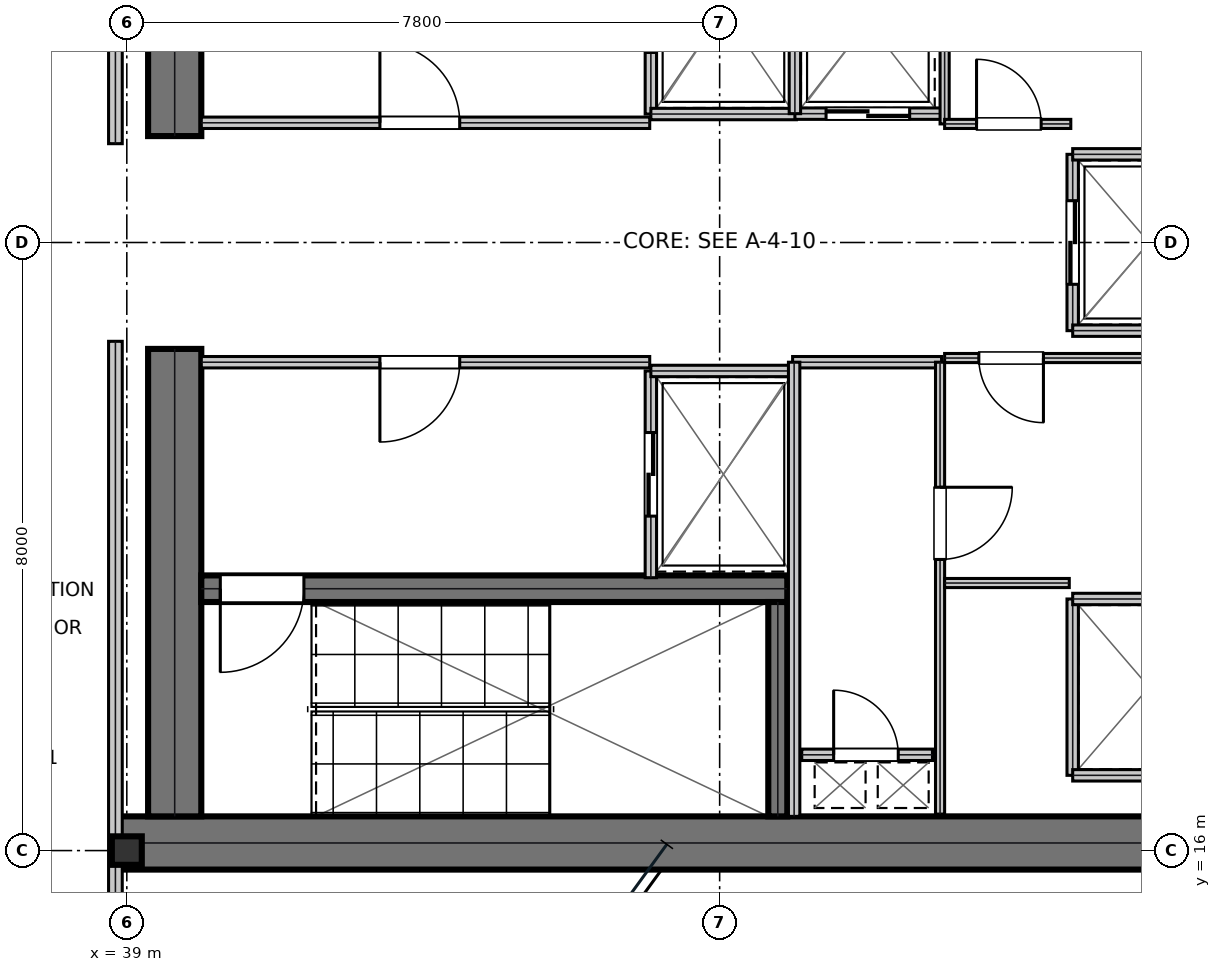
"""IFC4 building model, lengths in metres.
Left out: names, types, materials, properties, quantities, classifications, styles, units other than length and angle.
Written with IfcOpenShell. Run it as: python <this file> out.ifc"""

import sys

from ifc_helpers import new_model, si_unit, direction, frame, frame_2d, origin, origin_2d, place, context, subcontext, project, spatial, rectangle, i_section, extrude, element, fill, save


model = new_model("IFC4")
c1 = context("Model", 3, precision=1e-05, world=origin(), true_north=direction((0.0, 1.0)))
c2 = subcontext(c1, "Body", "Model", "MODEL_VIEW")
j1 = project(units=[si_unit("LENGTHUNIT", "METRE"), si_unit("PLANEANGLEUNIT", "RADIAN")], contexts=[c1])
p1 = place(None, origin())
s1 = spatial("IfcSite", under=j1, at=p1, CompositionType="ELEMENT")
p2 = place(p1, origin())
s2 = spatial("IfcBuilding", under=s1, at=p2, CompositionType="ELEMENT")
p3 = place(p2, frame((0.0, 0.0, 232.35)))
s3 = spatial("IfcBuildingStorey", under=s2, at=p3, CompositionType="ELEMENT", Elevation=232.35)
p4 = place(p3, frame((38.8, 16.1, 0.0), z_axis=(0.0, 0.0, 1.0), x_axis=(1.0, 0.0, 0.0)))
e1 = element("IfcWall", 1, at=p4, inside=s3, PredefinedType="SHEAR", context=c2, shape_type="SweptSolid", body=[
    extrude(rectangle(XDim=16.0, YDim=0.7, at=frame_2d((8.0, 0.0))), origin(), (0.0, 0.0, 1.0), 3.79),
])
for number, where, z_axis, x_axis in (
    (2, (39.63, 16.45, 0.0), (0.0, 0.0, 1.0), (0.0, 1.0, 0.0)),
    (3, (39.63, 25.4, 0.0), (0.0, 0.0, 1.0), (0.0, 1.0, 0.0)),
):
    element("IfcWall", number, at=place(p3, frame(where, z_axis=z_axis, x_axis=x_axis)), inside=s3, PredefinedType="SHEAR", context=c2, shape_type="SweptSolid", body=[
        extrude(rectangle(XDim=6.15, YDim=0.7, at=frame_2d((3.075, 0.0))), origin(), (0.0, 0.0, 1.0), 3.79),
    ])
p5 = place(p3, frame((39.98, 19.445, 0.0), z_axis=(0.0, 0.0, 1.0), x_axis=(1.0, 0.0, 0.0)))
e4 = element("IfcWall", 4, at=p5, inside=s3, PredefinedType="SHEAR", context=c2, shape_type="SweptSolid", body=[
    extrude(rectangle(XDim=7.71, YDim=0.35, at=frame_2d((3.855, 0.0))), origin(), (0.0, 0.0, 1.0), 3.79),
])
p6 = place(p5, frame((0.25, 0.0, 0.0)))
e5 = element("IfcOpeningElement", 5, at=p6, cuts=e4, PredefinedType="OPENING", context=c2, shape_type="SweptSolid", body=[
    extrude(rectangle(XDim=1.1, YDim=2.15, at=frame_2d((0.55, 1.075))), frame((0.0, 0.185, 0.0), z_axis=(0.0, -1.0, 0.0), x_axis=(1.0, 0.0, 0.0)), (0.0, 0.0, 1.0), 0.37),
])
p7 = place(p3, frame((47.565, 16.45, 0.0), z_axis=(0.0, 0.0, 1.0), x_axis=(0.0, 1.0, 0.0)))
e6 = element("IfcWall", 6, at=p7, inside=s3, PredefinedType="SHEAR", context=c2, shape_type="SweptSolid", body=[
    extrude(rectangle(XDim=2.82, YDim=0.25, at=frame_2d((1.41, 0.0))), origin(), (0.0, 0.0, 1.0), 3.79),
])
p8 = place(p3, frame((39.0, 16.0, 0.0), z_axis=(0.0, 0.0, 1.0), x_axis=(1.0, 0.0, 0.0)))
e7 = element("IfcColumn", 7, at=p8, inside=s3, PredefinedType="COLUMN", context=c2, shape_type="SweptSolid", body=[
    extrude(i_section(OverallWidth=0.394, OverallDepth=0.375, WebThickness=0.017, FlangeThickness=0.028, at=origin_2d()), origin(), (0.0, 0.0, 1.0), 4.044),
])
p9 = place(p3, frame((39.98, 25.575, 0.0), z_axis=(0.0, 0.0, 1.0), x_axis=(1.0, 0.0, 0.0)))
e8 = element("IfcWall", 8, at=p9, inside=s3, PredefinedType="PARTITIONING", context=c2, shape_type="SweptSolid", body=[
    extrude(rectangle(XDim=5.9, YDim=0.15, at=frame_2d((2.95, 0.0))), origin(), (0.0, 0.0, 1.0), 3.79),
])
p10 = place(p9, frame((2.35, 0.0, 0.0)))
e9 = element("IfcOpeningElement", 9, at=p10, cuts=e8, PredefinedType="OPENING", context=c2, shape_type="SweptSolid", body=[
    extrude(rectangle(XDim=1.05, YDim=2.15, at=frame_2d((0.525, 1.075))), frame((0.0, 0.085, 0.0), z_axis=(0.0, -1.0, 0.0), x_axis=(1.0, 0.0, 0.0)), (0.0, 0.0, 1.0), 0.17),
])
p11 = place(p3, frame((39.98, 22.425, 0.0), z_axis=(0.0, 0.0, 1.0), x_axis=(1.0, 0.0, 0.0)))
e10 = element("IfcWall", 10, at=p11, inside=s3, PredefinedType="PARTITIONING", context=c2, shape_type="SweptSolid", body=[
    extrude(rectangle(XDim=5.9, YDim=0.15, at=frame_2d((2.95, 0.0))), origin(), (0.0, 0.0, 1.0), 3.79),
])
p12 = place(p11, frame((2.35, 0.0, 0.0)))
e11 = element("IfcOpeningElement", 11, at=p12, cuts=e10, PredefinedType="OPENING", context=c2, shape_type="SweptSolid", body=[
    extrude(rectangle(XDim=1.05, YDim=2.15, at=frame_2d((0.525, 1.075))), frame((0.0, 0.085, 0.0), z_axis=(0.0, -1.0, 0.0), x_axis=(1.0, 0.0, 0.0)), (0.0, 0.0, 1.0), 0.17),
])
p13 = place(p3, frame((45.895, 25.69, 0.0), z_axis=(0.0, 0.0, 1.0), x_axis=(0.0, 1.0, 0.0)))
e12 = element("IfcWall", 12, at=p13, inside=s3, PredefinedType="PARTITIONING", context=c2, shape_type="SweptSolid", body=[
    extrude(rectangle(XDim=2.72, YDim=0.15, at=frame_2d((1.36, 0.0))), origin(), (0.0, 0.0, 1.0), 3.79),
])
p14 = place(p13, frame((0.81, 0.0, 0.0)))
e13 = element("IfcOpeningElement", 13, at=p14, cuts=e12, PredefinedType="OPENING", context=c2, shape_type="SweptSolid", body=[
    extrude(rectangle(XDim=1.1, YDim=2.15, at=frame_2d((0.55, 1.075))), frame((0.0, 0.085, 0.0), z_axis=(0.0, -1.0, 0.0), x_axis=(1.0, 0.0, 0.0)), (0.0, 0.0, 1.0), 0.17),
])
p15 = place(p3, frame((45.895, 25.69, 0.0), z_axis=(0.0, 0.0, 1.0), x_axis=(1.0, 0.0, 0.0)))
e14 = element("IfcWall", 14, at=p15, inside=s3, PredefinedType="PARTITIONING", context=c2, shape_type="SweptSolid", body=[
    extrude(rectangle(XDim=1.915, YDim=0.15, at=frame_2d((0.958, 0.0))), origin(), (0.0, 0.0, 1.0), 3.79),
])
p16 = place(p3, frame((45.895, 19.59, 0.0), z_axis=(0.0, 0.0, 1.0), x_axis=(0.0, 1.0, 0.0)))
e15 = element("IfcWall", 15, at=p16, inside=s3, PredefinedType="PARTITIONING", context=c2, shape_type="SweptSolid", body=[
    extrude(rectangle(XDim=2.72, YDim=0.15, at=frame_2d((1.36, 0.0))), origin(), (0.0, 0.0, 1.0), 3.79),
])
p17 = place(p16, frame((0.81, 0.0, 0.0)))
e16 = element("IfcOpeningElement", 16, at=p17, cuts=e15, PredefinedType="OPENING", context=c2, shape_type="SweptSolid", body=[
    extrude(rectangle(XDim=1.1, YDim=2.15, at=frame_2d((0.55, 1.075))), frame((0.0, 0.085, 0.0), z_axis=(0.0, -1.0, 0.0), x_axis=(1.0, 0.0, 0.0)), (0.0, 0.0, 1.0), 0.17),
])
p18 = place(p3, frame((45.895, 22.31, 0.0), z_axis=(0.0, 0.0, 1.0), x_axis=(1.0, 0.0, 0.0)))
e17 = element("IfcWall", 17, at=p18, inside=s3, PredefinedType="PARTITIONING", context=c2, shape_type="SweptSolid", body=[
    extrude(rectangle(XDim=1.915, YDim=0.15, at=frame_2d((0.958, 0.0))), origin(), (0.0, 0.0, 1.0), 3.79),
])
p19 = place(p3, frame((47.79, 25.695, 0.0), z_axis=(0.0, 0.0, 1.0), x_axis=(1.0, 0.0, 0.0)))
e18 = element("IfcWall", 18, at=p19, inside=s3, PredefinedType="PARTITIONING", context=c2, shape_type="SweptSolid", body=[
    extrude(rectangle(XDim=1.92, YDim=0.15, at=frame_2d((0.96, 0.0))), origin(), (0.0, 0.0, 1.0), 3.79),
])
p20 = place(p19, frame((0.41, 0.0, 0.0)))
e19 = element("IfcOpeningElement", 19, at=p20, cuts=e18, PredefinedType="OPENING", context=c2, shape_type="SweptSolid", body=[
    extrude(rectangle(XDim=1.1, YDim=2.15, at=frame_2d((0.55, 1.075))), frame((0.0, 0.085, 0.0), z_axis=(0.0, -1.0, 0.0), x_axis=(1.0, 0.0, 0.0)), (0.0, 0.0, 1.0), 0.17),
])
p21 = place(p3, frame((47.79, 25.695, 0.0), z_axis=(0.0, 0.0, 1.0), x_axis=(0.0, 1.0, 0.0)))
e20 = element("IfcWall", 20, at=p21, inside=s3, PredefinedType="PARTITIONING", context=c2, shape_type="SweptSolid", body=[
    extrude(rectangle(XDim=2.415, YDim=0.15, at=frame_2d((1.208, 0.0))), origin(), (0.0, 0.0, 1.0), 3.79),
])
p22 = place(p3, frame((51.445, 22.84, 0.0), z_axis=(0.0, 0.0, 1.0), x_axis=(0.0, 1.0, 0.0)))
e21 = element("IfcWall", 21, at=p22, inside=s3, PredefinedType="PARTITIONING", context=c2, shape_type="SweptSolid", body=[
    extrude(rectangle(XDim=2.32, YDim=0.15, at=frame_2d((1.16, 0.0))), origin(), (0.0, 0.0, 1.0), 3.79),
])
p23 = place(p22, frame((0.61, 0.0, 0.0)))
e22 = element("IfcOpeningElement", 22, at=p23, cuts=e21, PredefinedType="OPENING", context=c2, shape_type="SweptSolid", body=[
    extrude(rectangle(XDim=1.1, YDim=2.15, at=frame_2d((0.55, 1.075))), frame((0.0, 0.085, 0.0), z_axis=(0.0, -1.0, 0.0), x_axis=(1.0, 0.0, 0.0)), (0.0, 0.0, 1.0), 0.17),
])
for number, where, z_axis, x_axis in (
    (23, (51.445, 22.84, 0.0), (0.0, 0.0, 1.0), (1.0, 0.0, 0.0)),
    (24, (51.445, 25.16, 0.0), (0.0, 0.0, 1.0), (1.0, 0.0, 0.0)),
):
    element("IfcWall", number, at=place(p3, frame(where, z_axis=z_axis, x_axis=x_axis)), inside=s3, PredefinedType="PARTITIONING", context=c2, shape_type="SweptSolid", body=[
        extrude(rectangle(XDim=2.015, YDim=0.15, at=frame_2d((1.007, 0.0))), origin(), (0.0, 0.0, 1.0), 3.79),
    ])
p24 = place(p3, frame((51.445, 16.99, 0.0), z_axis=(0.0, 0.0, 1.0), x_axis=(0.0, 1.0, 0.0)))
e25 = element("IfcWall", 25, at=p24, inside=s3, PredefinedType="PARTITIONING", context=c2, shape_type="SweptSolid", body=[
    extrude(rectangle(XDim=2.32, YDim=0.15, at=frame_2d((1.16, 0.0))), origin(), (0.0, 0.0, 1.0), 3.79),
])
for number, where, z_axis, x_axis in (
    (26, (51.445, 16.99, 0.0), (0.0, 0.0, 1.0), (1.0, 0.0, 0.0)),
    (27, (51.445, 19.31, 0.0), (0.0, 0.0, 1.0), (1.0, 0.0, 0.0)),
):
    element("IfcWall", number, at=place(p3, frame(where, z_axis=z_axis, x_axis=x_axis)), inside=s3, PredefinedType="PARTITIONING", context=c2, shape_type="SweptSolid", body=[
        extrude(rectangle(XDim=2.015, YDim=0.15, at=frame_2d((1.007, 0.0))), origin(), (0.0, 0.0, 1.0), 3.79),
    ])
p25 = place(p3, frame((47.88, 17.26, 0.0), z_axis=(0.0, 0.0, 1.0), x_axis=(1.0, 0.0, 0.0)))
e28 = element("IfcWall", 28, at=p25, inside=s3, PredefinedType="PARTITIONING", context=c2, shape_type="SweptSolid", body=[
    extrude(rectangle(XDim=1.72, YDim=0.15, at=frame_2d((0.86, 0.0))), origin(), (0.0, 0.0, 1.0), 3.79),
])
p26 = place(p25, frame((0.42, 0.0, 0.0)))
e29 = element("IfcOpeningElement", 29, at=p26, cuts=e28, PredefinedType="OPENING", context=c2, shape_type="SweptSolid", body=[
    extrude(rectangle(XDim=0.85, YDim=2.15, at=frame_2d((0.425, 1.075))), frame((0.0, 0.085, 0.0), z_axis=(0.0, -1.0, 0.0), x_axis=(1.0, 0.0, 0.0)), (0.0, 0.0, 1.0), 0.17),
])
p27 = place(p3, frame((47.76, 22.425, 0.0), z_axis=(0.0, 0.0, 1.0), x_axis=(1.0, 0.0, 0.0)))
e30 = element("IfcWall", 30, at=p27, inside=s3, PredefinedType="PARTITIONING", context=c2, shape_type="SweptSolid", body=[
    extrude(rectangle(XDim=1.96, YDim=0.15, at=frame_2d((0.98, 0.0))), origin(), (0.0, 0.0, 1.0), 3.79),
])
p28 = place(p3, frame((47.78, 16.45, 0.0), z_axis=(0.0, 0.0, 1.0), x_axis=(0.0, 1.0, 0.0)))
e31 = element("IfcWall", 31, at=p28, inside=s3, PredefinedType="PARTITIONING", context=c2, shape_type="SweptSolid", body=[
    extrude(rectangle(XDim=5.975, YDim=0.15, at=frame_2d((2.988, 0.0))), origin(), (0.0, 0.0, 1.0), 3.79),
])
p29 = place(p3, frame((49.7, 16.48, 0.0), z_axis=(0.0, 0.0, 1.0), x_axis=(0.0, 1.0, 0.0)))
e32 = element("IfcWall", 32, at=p29, inside=s3, PredefinedType="PARTITIONING", context=c2, shape_type="SweptSolid", body=[
    extrude(rectangle(XDim=5.945, YDim=0.12, at=frame_2d((2.973, 0.0))), origin(), (0.0, 0.0, 1.0), 3.79),
])
p30 = place(p29, frame((3.35, 0.0, 0.0)))
e33 = element("IfcOpeningElement", 33, at=p30, cuts=e32, PredefinedType="OPENING", context=c2, shape_type="SweptSolid", body=[
    extrude(rectangle(XDim=0.95, YDim=2.15, at=frame_2d((0.475, 1.075))), frame((0.0, 0.07, 0.0), z_axis=(0.0, -1.0, 0.0), x_axis=(1.0, 0.0, 0.0)), (0.0, 0.0, 1.0), 0.14),
])
p31 = place(p3, frame((49.76, 22.48, 0.0), z_axis=(0.0, 0.0, 1.0), x_axis=(1.0, 0.0, 0.0)))
e34 = element("IfcWall", 34, at=p31, inside=s3, PredefinedType="PARTITIONING", context=c2, shape_type="SweptSolid", body=[
    extrude(rectangle(XDim=3.9, YDim=0.12, at=frame_2d((1.95, 0.0))), origin(), (0.0, 0.0, 1.0), 3.79),
])
p32 = place(p31, frame((0.45, 0.0, 0.0)))
e35 = element("IfcOpeningElement", 35, at=p32, cuts=e34, PredefinedType="OPENING", context=c2, shape_type="SweptSolid", body=[
    extrude(rectangle(XDim=0.85, YDim=2.15, at=frame_2d((0.425, 1.075))), frame((0.0, 0.07, 0.0), z_axis=(0.0, -1.0, 0.0), x_axis=(1.0, 0.0, 0.0)), (0.0, 0.0, 1.0), 0.14),
])
p33 = place(p3, frame((49.76, 19.52, 0.0), z_axis=(0.0, 0.0, 1.0), x_axis=(1.0, 0.0, 0.0)))
e36 = element("IfcWall", 36, at=p33, inside=s3, PredefinedType="PARTITIONING", context=c2, shape_type="SweptSolid", body=[
    extrude(rectangle(XDim=1.64, YDim=0.12, at=frame_2d((0.82, 0.0))), origin(), (0.0, 0.0, 1.0), 3.79),
])
p34 = place(p3, frame((49.76, 25.56, 0.0), z_axis=(0.0, 0.0, 1.0), x_axis=(0.0, 1.0, 0.0)))
e37 = element("IfcWall", 37, at=p34, inside=s3, PredefinedType="PARTITIONING", context=c2, shape_type="SweptSolid", body=[
    extrude(rectangle(XDim=2.66, YDim=0.12, at=frame_2d((1.33, 0.0))), origin(), (0.0, 0.0, 1.0), 3.79),
])
p35 = place(p3, frame((49.76, 25.56, 0.0), z_axis=(0.0, 0.0, 1.0), x_axis=(1.0, 0.0, 0.0)))
e38 = element("IfcWall", 38, at=p35, inside=s3, PredefinedType="PARTITIONING", context=c2, shape_type="SweptSolid", body=[
    extrude(rectangle(XDim=1.66, YDim=0.12, at=frame_2d((0.83, 0.0))), origin(), (0.0, 0.0, 1.0), 3.79),
])
p36 = place(p35, frame((0.42, 0.0, 0.0)))
e39 = element("IfcOpeningElement", 39, at=p36, cuts=e38, PredefinedType="OPENING", context=c2, shape_type="SweptSolid", body=[
    extrude(rectangle(XDim=0.85, YDim=2.15, at=frame_2d((0.425, 1.075))), frame((0.0, 0.07, 0.0), z_axis=(0.0, -1.0, 0.0), x_axis=(1.0, 0.0, 0.0)), (0.0, 0.0, 1.0), 0.14),
])
for number, where, z_axis, x_axis in (
    (40, (38.85, 14.5, 0.0), (0.0, 0.0, 1.0), (0.0, 1.0, 0.0)),
    (41, (38.85, 25.3, 0.0), (0.0, 0.0, 1.0), (0.0, 1.0, 0.0)),
):
    element("IfcWall", number, at=place(p3, frame(where, z_axis=z_axis, x_axis=x_axis)), inside=s3, PredefinedType="SOLIDWALL", context=c2, shape_type="SweptSolid", body=[
        extrude(rectangle(XDim=8.2, YDim=0.18, at=frame_2d((4.1, 0.0))), origin(), (0.0, 0.0, 1.0), 3.241),
    ])
p37 = place(p10, origin())
e42 = element("IfcDoor", 42, at=p37, inside=s3, OperationType="SINGLE_SWING_LEFT", PredefinedType="DOOR", context=c2, shape_type="SweptSolid", body=[
    extrude(rectangle(XDim=1.05, YDim=2.15, at=frame_2d((0.525, 1.075))), frame((0.0, 0.025, 0.0), z_axis=(0.0, -1.0, 0.0), x_axis=(1.0, 0.0, 0.0)), (0.0, 0.0, 1.0), 0.05),
])
fill(e9, e42)
p38 = place(p12, frame((1.05, 0.0, 0.0), z_axis=(0.0, 0.0, 1.0), x_axis=(-1.0, 0.0, 0.0)))
e43 = element("IfcDoor", 43, at=p38, inside=s3, OperationType="SINGLE_SWING_RIGHT", PredefinedType="DOOR", context=c2, shape_type="SweptSolid", body=[
    extrude(rectangle(XDim=1.05, YDim=2.15, at=frame_2d((0.525, 1.075))), frame((0.0, 0.025, 0.0), z_axis=(0.0, -1.0, 0.0), x_axis=(1.0, 0.0, 0.0)), (0.0, 0.0, 1.0), 0.05),
])
fill(e11, e43)
p39 = place(p17, frame((1.1, 0.0, 0.0), z_axis=(0.0, 0.0, 1.0), x_axis=(-1.0, 0.0, 0.0)))
e44 = element("IfcDoor", 44, at=p39, inside=s3, OperationType="DOUBLE_DOOR_SLIDING", PredefinedType="DOOR", context=c2, shape_type="SweptSolid", body=[
    extrude(rectangle(XDim=1.1, YDim=2.15, at=frame_2d((0.55, 1.075))), frame((0.0, 0.025, 0.0), z_axis=(0.0, -1.0, 0.0), x_axis=(1.0, 0.0, 0.0)), (0.0, 0.0, 1.0), 0.05),
])
fill(e16, e44)
p40 = place(p20, frame((1.1, 0.0, 0.0), z_axis=(0.0, 0.0, 1.0), x_axis=(-1.0, 0.0, 0.0)))
e45 = element("IfcDoor", 45, at=p40, inside=s3, OperationType="DOUBLE_DOOR_SLIDING", PredefinedType="DOOR", context=c2, shape_type="SweptSolid", body=[
    extrude(rectangle(XDim=1.1, YDim=2.15, at=frame_2d((0.55, 1.075))), frame((0.0, 0.025, 0.0), z_axis=(0.0, -1.0, 0.0), x_axis=(1.0, 0.0, 0.0)), (0.0, 0.0, 1.0), 0.05),
])
fill(e19, e45)
p41 = place(p23, frame((1.1, 0.0, 0.0), z_axis=(0.0, 0.0, 1.0), x_axis=(-1.0, 0.0, 0.0)))
e46 = element("IfcDoor", 46, at=p41, inside=s3, OperationType="DOUBLE_DOOR_SLIDING", PredefinedType="DOOR", context=c2, shape_type="SweptSolid", body=[
    extrude(rectangle(XDim=1.1, YDim=2.15, at=frame_2d((0.55, 1.075))), frame((0.0, 0.025, 0.0), z_axis=(0.0, -1.0, 0.0), x_axis=(1.0, 0.0, 0.0)), (0.0, 0.0, 1.0), 0.05),
])
fill(e22, e46)
p42 = place(p26, origin())
e47 = element("IfcDoor", 47, at=p42, inside=s3, OperationType="SINGLE_SWING_LEFT", PredefinedType="TRAPDOOR", context=c2, shape_type="SweptSolid", body=[
    extrude(rectangle(XDim=0.85, YDim=2.15, at=frame_2d((0.425, 1.075))), frame((0.0, 0.025, 0.0), z_axis=(0.0, -1.0, 0.0), x_axis=(1.0, 0.0, 0.0)), (0.0, 0.0, 1.0), 0.05),
])
fill(e29, e47)
p43 = place(p30, frame((0.95, 0.0, 0.0), z_axis=(0.0, 0.0, 1.0), x_axis=(-1.0, 0.0, 0.0)))
e48 = element("IfcDoor", 48, at=p43, inside=s3, OperationType="SINGLE_SWING_LEFT", PredefinedType="DOOR", context=c2, shape_type="SweptSolid", body=[
    extrude(rectangle(XDim=0.95, YDim=2.15, at=frame_2d((0.475, 1.075))), frame((0.0, 0.025, 0.0), z_axis=(0.0, -1.0, 0.0), x_axis=(1.0, 0.0, 0.0)), (0.0, 0.0, 1.0), 0.05),
])
fill(e33, e48)
p44 = place(p32, frame((0.85, 0.0, 0.0), z_axis=(0.0, 0.0, 1.0), x_axis=(-1.0, 0.0, 0.0)))
e49 = element("IfcDoor", 49, at=p44, inside=s3, OperationType="SINGLE_SWING_LEFT", PredefinedType="DOOR", context=c2, shape_type="SweptSolid", body=[
    extrude(rectangle(XDim=0.85, YDim=2.15, at=frame_2d((0.425, 1.075))), frame((0.0, 0.025, 0.0), z_axis=(0.0, -1.0, 0.0), x_axis=(1.0, 0.0, 0.0)), (0.0, 0.0, 1.0), 0.05),
])
fill(e35, e49)
p45 = place(p36, origin())
e50 = element("IfcDoor", 50, at=p45, inside=s3, OperationType="SINGLE_SWING_LEFT", PredefinedType="DOOR", context=c2, shape_type="SweptSolid", body=[
    extrude(rectangle(XDim=0.85, YDim=2.15, at=frame_2d((0.425, 1.075))), frame((0.0, 0.025, 0.0), z_axis=(0.0, -1.0, 0.0), x_axis=(1.0, 0.0, 0.0)), (0.0, 0.0, 1.0), 0.05),
])
fill(e39, e50)
p46 = place(p6, frame((1.1, 0.0, 0.0), z_axis=(0.0, 0.0, 1.0), x_axis=(-1.0, 0.0, 0.0)))
e51 = element("IfcDoor", 51, at=p46, inside=s3, OperationType="SINGLE_SWING_RIGHT", PredefinedType="DOOR", context=c2, shape_type="SweptSolid", body=[
    extrude(rectangle(XDim=1.1, YDim=2.15, at=frame_2d((0.55, 1.075))), frame((0.0, 0.025, 0.0), z_axis=(0.0, -1.0, 0.0), x_axis=(1.0, 0.0, 0.0)), (0.0, 0.0, 1.0), 0.05),
])
fill(e5, e51)
save(model, sys.argv[1])
